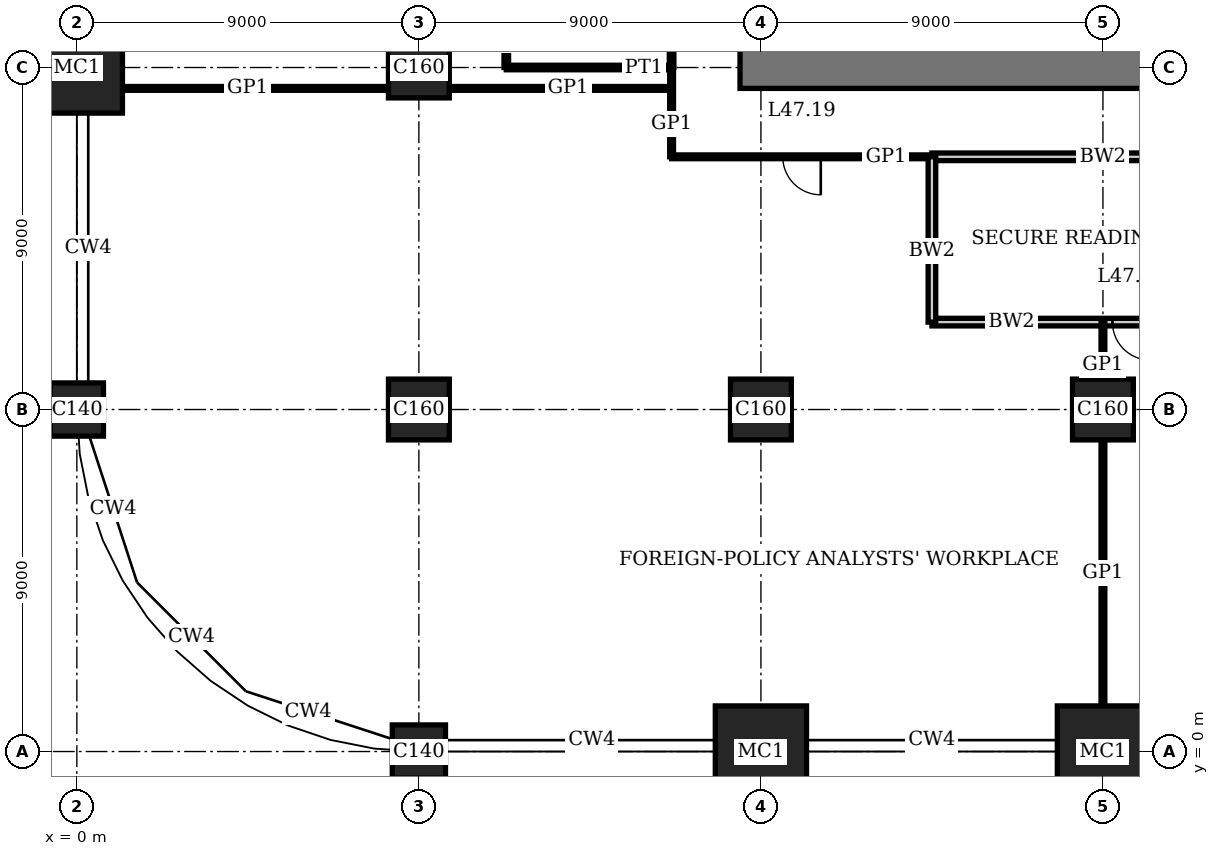
"""IFC4 building model, lengths in metres.
Left out: names, types, materials, properties, quantities, classifications, styles, units other than length and angle.
Written with IfcOpenShell. Run it as: python <this file> out.ifc"""

import sys

from ifc_helpers import new_model, si_unit, direction, frame, frame_2d, origin, origin_2d, place, context, subcontext, project, spatial, rectangle, extrude, element, fill, save


model = new_model("IFC4")
c1 = context("Model", 3, precision=1e-05, world=origin(), true_north=direction((0.0, 1.0)))
c2 = subcontext(c1, "Body", "Model", "MODEL_VIEW")
j1 = project(units=[si_unit("LENGTHUNIT", "METRE"), si_unit("PLANEANGLEUNIT", "RADIAN")], contexts=[c1])
p1 = place(None, origin())
s1 = spatial("IfcSite", under=j1, at=p1, CompositionType="ELEMENT")
p2 = place(p1, origin())
s2 = spatial("IfcBuilding", under=s1, at=p2, CompositionType="ELEMENT")
p3 = place(p2, frame((0.0, 0.0, 194.2)))
s3 = spatial("IfcBuildingStorey", under=s2, at=p3, CompositionType="ELEMENT", Elevation=194.2)
p4 = place(p3, frame((0.0, 9.0, 0.0), z_axis=(0.0, 0.0, 1.0), x_axis=(1.0, 0.0, 0.0)))
e1 = element("IfcColumn", 1, at=p4, inside=s3, PredefinedType="COLUMN", context=c2, shape_type="SweptSolid", body=[
    extrude(rectangle(XDim=1.4, YDim=1.4, at=origin_2d()), origin(), (0.0, 0.0, 1.0), 4.0),
])
p5 = place(p3, frame((0.0, 18.0, 0.0), z_axis=(0.0, 0.0, 1.0), x_axis=(1.0, 0.0, 0.0)))
e2 = element("IfcColumn", 2, at=p5, inside=s3, PredefinedType="COLUMN", context=c2, shape_type="SweptSolid", body=[
    extrude(rectangle(XDim=2.4, YDim=2.4, at=origin_2d()), origin(), (0.0, 0.0, 1.0), 4.0),
])
p6 = place(p3, frame((9.0, 0.0, 0.0), z_axis=(0.0, 0.0, 1.0), x_axis=(1.0, 0.0, 0.0)))
e3 = element("IfcColumn", 3, at=p6, inside=s3, PredefinedType="COLUMN", context=c2, shape_type="SweptSolid", body=[
    extrude(rectangle(XDim=1.4, YDim=1.4, at=origin_2d()), origin(), (0.0, 0.0, 1.0), 4.0),
])
for number, where, z_axis, x_axis in (
    (4, (9.0, 9.0, 0.0), (0.0, 0.0, 1.0), (1.0, 0.0, 0.0)),
    (5, (9.0, 18.0, 0.0), (0.0, 0.0, 1.0), (1.0, 0.0, 0.0)),
):
    element("IfcColumn", number, at=place(p3, frame(where, z_axis=z_axis, x_axis=x_axis)), inside=s3, PredefinedType="COLUMN", context=c2, shape_type="SweptSolid", body=[
        extrude(rectangle(XDim=1.6, YDim=1.6, at=origin_2d()), origin(), (0.0, 0.0, 1.0), 4.0),
    ])
p7 = place(p3, frame((18.0, 0.0, 0.0), z_axis=(0.0, 0.0, 1.0), x_axis=(1.0, 0.0, 0.0)))
e6 = element("IfcColumn", 6, at=p7, inside=s3, PredefinedType="COLUMN", context=c2, shape_type="SweptSolid", body=[
    extrude(rectangle(XDim=2.4, YDim=2.4, at=origin_2d()), origin(), (0.0, 0.0, 1.0), 4.0),
])
p8 = place(p3, frame((18.0, 9.0, 0.0), z_axis=(0.0, 0.0, 1.0), x_axis=(1.0, 0.0, 0.0)))
e7 = element("IfcColumn", 7, at=p8, inside=s3, PredefinedType="COLUMN", context=c2, shape_type="SweptSolid", body=[
    extrude(rectangle(XDim=1.6, YDim=1.6, at=origin_2d()), origin(), (0.0, 0.0, 1.0), 4.0),
])
p9 = place(p3, frame((27.0, 0.0, 0.0), z_axis=(0.0, 0.0, 1.0), x_axis=(1.0, 0.0, 0.0)))
e8 = element("IfcColumn", 8, at=p9, inside=s3, PredefinedType="COLUMN", context=c2, shape_type="SweptSolid", body=[
    extrude(rectangle(XDim=2.4, YDim=2.4, at=origin_2d()), origin(), (0.0, 0.0, 1.0), 4.0),
])
p10 = place(p3, frame((27.0, 9.0, 0.0), z_axis=(0.0, 0.0, 1.0), x_axis=(1.0, 0.0, 0.0)))
e9 = element("IfcColumn", 9, at=p10, inside=s3, PredefinedType="COLUMN", context=c2, shape_type="SweptSolid", body=[
    extrude(rectangle(XDim=1.6, YDim=1.6, at=origin_2d()), origin(), (0.0, 0.0, 1.0), 4.0),
])
p11 = place(p3, frame((17.45, 18.0, 0.0), z_axis=(0.0, 0.0, 1.0), x_axis=(1.0, 0.0, 0.0)))
e10 = element("IfcWall", 10, at=p11, inside=s3, PredefinedType="SHEAR", context=c2, shape_type="SweptSolid", body=[
    extrude(rectangle(XDim=28.1, YDim=1.1, at=frame_2d((14.05, 0.0))), origin(), (0.0, 0.0, 1.0), 4.0),
])
p12 = place(p11, frame((11.55, 0.0, 0.0)))
e11 = element("IfcOpeningElement", 11, at=p12, cuts=e10, PredefinedType="OPENING", context=c2, shape_type="SweptSolid", body=[
    extrude(rectangle(XDim=1.0, YDim=2.4, at=frame_2d((0.5, 1.2))), frame((0.0, 0.56, 0.0), z_axis=(0.0, -1.0, 0.0), x_axis=(1.0, 0.0, 0.0)), (0.0, 0.0, 1.0), 1.12),
])
p13 = place(p11, frame((16.55, 0.0, 0.0)))
e12 = element("IfcOpeningElement", 12, at=p13, cuts=e10, PredefinedType="OPENING", context=c2, shape_type="SweptSolid", body=[
    extrude(rectangle(XDim=1.0, YDim=2.4, at=frame_2d((0.5, 1.2))), frame((0.0, 0.56, 0.0), z_axis=(0.0, -1.0, 0.0), x_axis=(1.0, 0.0, 0.0)), (0.0, 0.0, 1.0), 1.12),
])
p14 = place(p11, frame((20.0, 0.0, 0.0)))
e13 = element("IfcOpeningElement", 13, at=p14, cuts=e10, PredefinedType="OPENING", context=c2, shape_type="SweptSolid", body=[
    extrude(rectangle(XDim=1.1, YDim=2.4, at=frame_2d((0.55, 1.2))), frame((0.0, 0.56, 0.0), z_axis=(0.0, -1.0, 0.0), x_axis=(1.0, 0.0, 0.0)), (0.0, 0.0, 1.0), 1.12),
])
p15 = place(p11, frame((24.05, 0.0, 0.0)))
e14 = element("IfcOpeningElement", 14, at=p15, cuts=e10, PredefinedType="OPENING", context=c2, shape_type="SweptSolid", body=[
    extrude(rectangle(XDim=1.0, YDim=2.4, at=frame_2d((0.5, 1.2))), frame((0.0, 0.56, 0.0), z_axis=(0.0, -1.0, 0.0), x_axis=(1.0, 0.0, 0.0)), (0.0, 0.0, 1.0), 1.12),
])
p16 = place(p3, frame((22.5, 11.3, 0.0), z_axis=(0.0, 0.0, 1.0), x_axis=(1.0, 0.0, 0.0)))
e15 = element("IfcWall", 15, at=p16, inside=s3, PredefinedType="SOLIDWALL", context=c2, shape_type="SweptSolid", body=[
    extrude(rectangle(XDim=9.0, YDim=0.2, at=frame_2d((4.5, 0.0))), origin(), (0.0, 0.0, 1.0), 3.75),
])
p17 = place(p16, frame((4.75, 0.0, 0.0)))
e16 = element("IfcOpeningElement", 16, at=p17, cuts=e15, PredefinedType="OPENING", context=c2, shape_type="SweptSolid", body=[
    extrude(rectangle(XDim=1.0, YDim=2.4, at=frame_2d((0.5, 1.2))), frame((0.0, 0.11, 0.0), z_axis=(0.0, -1.0, 0.0), x_axis=(1.0, 0.0, 0.0)), (0.0, 0.0, 1.0), 0.22),
])
p18 = place(p3, frame((22.5, 15.65, 0.0), z_axis=(0.0, 0.0, 1.0), x_axis=(1.0, 0.0, 0.0)))
e17 = element("IfcWall", 17, at=p18, inside=s3, PredefinedType="SOLIDWALL", context=c2, shape_type="SweptSolid", body=[
    extrude(rectangle(XDim=9.0, YDim=0.2, at=frame_2d((4.5, 0.0))), origin(), (0.0, 0.0, 1.0), 3.75),
])
p19 = place(p3, frame((15.65, 15.65, 0.0), z_axis=(0.0, 0.0, 1.0), x_axis=(1.0, 0.0, 0.0)))
e18 = element("IfcWall", 18, at=p19, inside=s3, PredefinedType="PARTITIONING", context=c2, shape_type="SweptSolid", body=[
    extrude(rectangle(XDim=6.85, YDim=0.1, at=frame_2d((3.425, 0.0))), origin(), (0.0, 0.0, 1.0), 3.75),
])
p20 = place(p19, frame((2.925, 0.0, 0.0)))
e19 = element("IfcOpeningElement", 19, at=p20, cuts=e18, PredefinedType="OPENING", context=c2, shape_type="SweptSolid", body=[
    extrude(rectangle(XDim=1.0, YDim=2.4, at=frame_2d((0.5, 1.2))), frame((0.0, 0.06, 0.0), z_axis=(0.0, -1.0, 0.0), x_axis=(1.0, 0.0, 0.0)), (0.0, 0.0, 1.0), 0.12),
])
p21 = place(p3, frame((1.2, 17.45, 0.0), z_axis=(0.0, 0.0, 1.0), x_axis=(1.0, 0.0, 0.0)))
e20 = element("IfcWall", 20, at=p21, inside=s3, PredefinedType="PARTITIONING", context=c2, shape_type="SweptSolid", body=[
    extrude(rectangle(XDim=7.0, YDim=0.1, at=frame_2d((3.5, 0.0))), origin(), (0.0, 0.0, 1.0), 3.75),
])
p22 = place(p3, frame((9.8, 17.45, 0.0), z_axis=(0.0, 0.0, 1.0), x_axis=(1.0, 0.0, 0.0)))
e21 = element("IfcWall", 21, at=p22, inside=s3, PredefinedType="PARTITIONING", context=c2, shape_type="SweptSolid", body=[
    extrude(rectangle(XDim=5.85, YDim=0.1, at=frame_2d((2.925, 0.0))), origin(), (0.0, 0.0, 1.0), 3.75),
])
p23 = place(p3, frame((11.3, 18.0, 0.0), z_axis=(0.0, 0.0, 1.0), x_axis=(1.0, 0.0, 0.0)))
e22 = element("IfcWall", 22, at=p23, inside=s3, PredefinedType="PARTITIONING", context=c2, shape_type="SweptSolid", body=[
    extrude(rectangle(XDim=4.35, YDim=0.12, at=frame_2d((2.175, 0.0))), origin(), (0.0, 0.0, 1.0), 3.05),
])
p24 = place(p3, frame((11.3, 18.0, 0.0), z_axis=(0.0, 0.0, 1.0), x_axis=(0.0, 1.0, 0.0)))
e23 = element("IfcWall", 23, at=p24, inside=s3, PredefinedType="PARTITIONING", context=c2, shape_type="SweptSolid", body=[
    extrude(rectangle(XDim=4.5, YDim=0.12, at=frame_2d((2.25, 0.0))), origin(), (0.0, 0.0, 1.0), 3.75),
])
p25 = place(p24, frame((1.75, 0.0, 0.0)))
e24 = element("IfcOpeningElement", 24, at=p25, cuts=e23, PredefinedType="OPENING", context=c2, shape_type="SweptSolid", body=[
    extrude(rectangle(XDim=1.0, YDim=2.4, at=frame_2d((0.5, 1.2))), frame((0.0, 0.07, 0.0), z_axis=(0.0, -1.0, 0.0), x_axis=(1.0, 0.0, 0.0)), (0.0, 0.0, 1.0), 0.14),
])
p26 = place(p3, frame((15.65, 18.0, 0.0), z_axis=(0.0, 0.0, 1.0), x_axis=(0.0, 1.0, 0.0)))
e25 = element("IfcWall", 25, at=p26, inside=s3, PredefinedType="PARTITIONING", context=c2, shape_type="SweptSolid", body=[
    extrude(rectangle(XDim=4.5, YDim=0.12, at=frame_2d((2.25, 0.0))), origin(), (0.0, 0.0, 1.0), 3.75),
])
p27 = place(p3, frame((15.65, 15.65, 0.0), z_axis=(0.0, 0.0, 1.0), x_axis=(0.0, 1.0, 0.0)))
e26 = element("IfcWall", 26, at=p27, inside=s3, PredefinedType="PARTITIONING", context=c2, shape_type="SweptSolid", body=[
    extrude(rectangle(XDim=2.35, YDim=0.1, at=frame_2d((1.175, 0.0))), origin(), (0.0, 0.0, 1.0), 3.75),
])
p28 = place(p3, frame((22.5, 11.3, 0.0), z_axis=(0.0, 0.0, 1.0), x_axis=(0.0, 1.0, 0.0)))
e27 = element("IfcWall", 27, at=p28, inside=s3, PredefinedType="SOLIDWALL", context=c2, shape_type="SweptSolid", body=[
    extrude(rectangle(XDim=4.35, YDim=0.2, at=frame_2d((2.175, 0.0))), origin(), (0.0, 0.0, 1.0), 3.75),
])
p29 = place(p3, frame((27.0, 1.2, 0.0), z_axis=(0.0, 0.0, 1.0), x_axis=(0.0, 1.0, 0.0)))
e28 = element("IfcWall", 28, at=p29, inside=s3, PredefinedType="PARTITIONING", context=c2, shape_type="SweptSolid", body=[
    extrude(rectangle(XDim=7.0, YDim=0.1, at=frame_2d((3.5, 0.0))), origin(), (0.0, 0.0, 1.0), 3.05),
])
p30 = place(p3, frame((27.0, 9.8, 0.0), z_axis=(0.0, 0.0, 1.0), x_axis=(0.0, 1.0, 0.0)))
e29 = element("IfcWall", 29, at=p30, inside=s3, PredefinedType="PARTITIONING", context=c2, shape_type="SweptSolid", body=[
    extrude(rectangle(XDim=1.51, YDim=0.1, at=frame_2d((0.755, 0.0))), origin(), (0.0, 0.0, 1.0), 3.05),
])
p31 = place(p17, origin())
e30 = element("IfcDoor", 30, at=p31, inside=s3, OperationType="SINGLE_SWING_RIGHT", PredefinedType="DOOR", context=c2, shape_type="SweptSolid", body=[
    extrude(rectangle(XDim=1.0, YDim=2.4, at=frame_2d((0.5, 1.2))), frame((0.0, 0.035, 0.0), z_axis=(0.0, -1.0, 0.0), x_axis=(1.0, 0.0, 0.0)), (0.0, 0.0, 1.0), 0.07),
])
fill(e16, e30)
p32 = place(p20, origin())
e31 = element("IfcDoor", 31, at=p32, inside=s3, OperationType="SINGLE_SWING_RIGHT", PredefinedType="DOOR", context=c2, shape_type="SweptSolid", body=[
    extrude(rectangle(XDim=1.0, YDim=2.4, at=frame_2d((0.5, 1.2))), frame((0.0, 0.02, 0.0), z_axis=(0.0, -1.0, 0.0), x_axis=(1.0, 0.0, 0.0)), (0.0, 0.0, 1.0), 0.04),
])
fill(e19, e31)
save(model, sys.argv[1])
